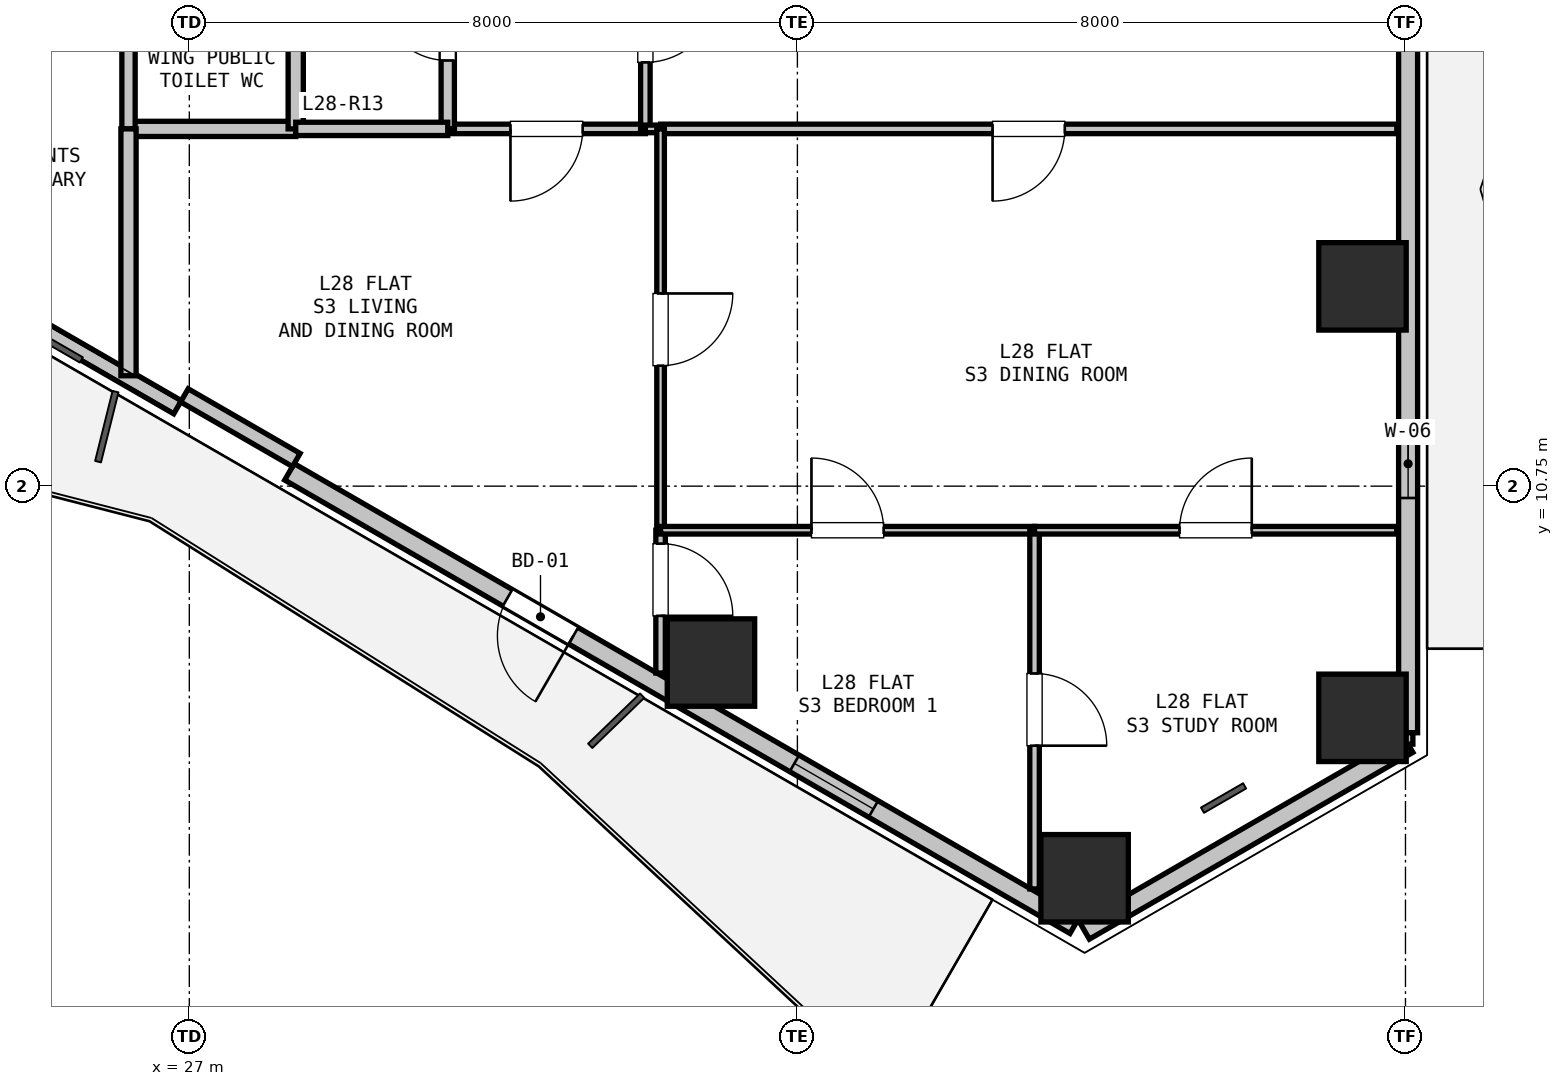
"""IFC4 building model, lengths in metres.
Left out: names, types, materials, properties, quantities, classifications, styles, units other than length and angle.
Written with IfcOpenShell. Run it as: python <this file> out.ifc"""

import sys

from ifc_helpers import new_model, si_unit, direction, frame, frame_2d, origin, origin_2d, place, context, subcontext, project, spatial, rectangle, hollow_rectangle, extrude, element, fill, save


model = new_model("IFC4")
c1 = context("Model", 3, precision=1e-05, world=origin(), true_north=direction((0.0, 1.0)))
c2 = subcontext(c1, "Body", "Model", "MODEL_VIEW")
j1 = project(units=[si_unit("LENGTHUNIT", "METRE"), si_unit("PLANEANGLEUNIT", "RADIAN")], contexts=[c1])
p1 = place(None, origin())
s1 = spatial("IfcSite", under=j1, at=p1, CompositionType="ELEMENT")
p2 = place(p1, origin())
s2 = spatial("IfcBuilding", under=s1, at=p2, CompositionType="ELEMENT")
p3 = place(p2, frame((0.0, 0.0, 103.2)))
s3 = spatial("IfcBuildingStorey", under=s2, at=p3, CompositionType="ELEMENT", Elevation=103.2)
for number, where, z_axis, x_axis in (
    (1, (42.435, 13.378, 0.0), (0.0, 0.0, 1.0), (1.0, 0.0, 0.0)),
    (2, (42.435, 7.702, 0.0), (0.0, 0.0, 1.0), (1.0, 0.0, 0.0)),
    (3, (38.779, 5.591, 0.0), (0.0, 0.0, 1.0), (1.0, 0.0, 0.0)),
    (4, (33.863, 8.429, 0.0), (0.0, 0.0, 1.0), (1.0, 0.0, 0.0)),
):
    element("IfcColumn", number, at=place(p3, frame(where, z_axis=z_axis, x_axis=x_axis)), inside=s3, PredefinedType="COLUMN", context=c2, shape_type="SweptSolid", body=[
        extrude(hollow_rectangle(XDim=1.15, YDim=1.15, WallThickness=0.032, at=origin_2d()), origin(), (0.0, 0.0, 1.0), 3.3),
    ])
p4 = place(p3, frame((43.035, 7.356, 0.0), z_axis=(0.0, 0.0, 1.0), x_axis=(-0.866011848704, -0.500023477353, 0.0)))
e5 = element("IfcWall", 5, at=p4, inside=s3, PredefinedType="SOLIDWALL", context=c2, shape_type="SweptSolid", body=[
    extrude(rectangle(XDim=4.914, YDim=0.25, at=frame_2d((2.457, 0.0))), origin(), (0.0, 0.0, 1.0), 2.67),
])
p5 = place(p3, frame((43.035, 19.435, 0.0), z_axis=(0.0, 0.0, 1.0), x_axis=(0.0, -1.0, 0.0)))
e6 = element("IfcWall", 6, at=p5, inside=s3, PredefinedType="SOLIDWALL", context=c2, shape_type="SweptSolid", body=[
    extrude(rectangle(XDim=11.93, YDim=0.25, at=frame_2d((5.965, 0.0))), origin(), (0.0, 0.0, 1.0), 2.67),
])
p6 = place(p5, frame((7.941, 0.0, 0.9)))
e7 = element("IfcOpeningElement", 7, at=p6, cuts=e6, PredefinedType="OPENING", context=c2, shape_type="SweptSolid", body=[
    extrude(rectangle(XDim=0.9, YDim=1.4, at=frame_2d((0.45, 0.7))), frame((0.0, 0.135, 0.0), z_axis=(0.0, -1.0, 0.0), x_axis=(1.0, 0.0, 0.0)), (0.0, 0.0, 1.0), 0.27),
])
p7 = place(p3, frame((38.649, 4.973, 0.0), z_axis=(0.0, 0.0, 1.0), x_axis=(-0.866023023012, 0.500004123596, 0.0)))
e8 = element("IfcWall", 8, at=p7, inside=s3, PredefinedType="SOLIDWALL", context=c2, shape_type="SweptSolid", body=[
    extrude(rectangle(XDim=11.93, YDim=0.25, at=frame_2d((5.965, 0.0))), origin(), (0.0, 0.0, 1.0), 2.67),
])
p8 = place(p7, frame((7.616, 0.0, 0.0)))
e9 = element("IfcOpeningElement", 9, at=p8, cuts=e8, PredefinedType="OPENING", context=c2, shape_type="SweptSolid", body=[
    extrude(rectangle(XDim=1.0, YDim=2.1, at=frame_2d((0.5, 1.05))), frame((0.0, 0.135, 0.0), z_axis=(0.0, -1.0, 0.0), x_axis=(1.0, 0.0, 0.0)), (0.0, 0.0, 1.0), 0.27),
])
p9 = place(p7, frame((3.059, 0.0, 0.9)))
e10 = element("IfcOpeningElement", 10, at=p9, cuts=e8, PredefinedType="OPENING", context=c2, shape_type="SweptSolid", body=[
    extrude(rectangle(XDim=1.2, YDim=1.4, at=frame_2d((0.6, 0.7))), frame((0.0, 0.135, 0.0), z_axis=(0.0, -1.0, 0.0), x_axis=(1.0, 0.0, 0.0)), (0.0, 0.0, 1.0), 0.27),
])
p10 = place(p3, frame((26.845, 11.788, 0.0), z_axis=(0.0, 0.0, 1.0), x_axis=(-0.866027010039, 0.499997217876, 0.0)))
e11 = element("IfcWall", 11, at=p10, inside=s3, PredefinedType="PARAPET", context=c2, shape_type="SweptSolid", body=[
    extrude(rectangle(XDim=11.229, YDim=0.2, at=frame_2d((5.615, 0.0))), origin(), (0.0, 0.0, 1.0), 0.2),
])
p11 = place(p3, frame((28.407, 11.094, 0.0), z_axis=(0.0, 0.0, 1.0), x_axis=(-0.86605165483, 0.499954529098, 0.0)))
e12 = element("IfcWall", 12, at=p11, inside=s3, PredefinedType="PARAPET", context=c2, shape_type="SweptSolid", body=[
    extrude(rectangle(XDim=1.7, YDim=0.2, at=frame_2d((0.85, 0.0))), origin(), (0.0, 0.0, 1.0), 2.67),
])
p12 = place(p3, frame((33.0, 15.45, 0.0), z_axis=(0.0, 0.0, 1.0), x_axis=(-1.0, 0.0, 0.0)))
e13 = element("IfcWall", 13, at=p12, inside=s3, PredefinedType="PARTITIONING", context=c2, shape_type="SweptSolid", body=[
    extrude(rectangle(XDim=2.6, YDim=0.125, at=frame_2d((1.3, 0.0))), origin(), (0.0, 0.0, 1.0), 3.05),
])
p13 = place(p12, frame((0.825, 0.0, 0.0)))
e14 = element("IfcOpeningElement", 14, at=p13, cuts=e13, PredefinedType="OPENING", context=c2, shape_type="SweptSolid", body=[
    extrude(rectangle(XDim=0.95, YDim=2.1, at=frame_2d((0.475, 1.05))), frame((0.0, 0.073, 0.0), z_axis=(0.0, -1.0, 0.0), x_axis=(1.0, 0.0, 0.0)), (0.0, 0.0, 1.0), 0.145),
])
p14 = place(p3, frame((30.4, 15.45, 0.0), z_axis=(0.0, 0.0, 1.0), x_axis=(0.0, 1.0, 0.0)))
e15 = element("IfcWall", 15, at=p14, inside=s3, PredefinedType="PLUMBINGWALL", context=c2, shape_type="SweptSolid", body=[
    extrude(rectangle(XDim=2.7, YDim=0.175, at=frame_2d((1.35, 0.0))), origin(), (0.0, 0.0, 1.0), 3.05),
])
p15 = place(p14, frame((0.9, 0.0, 0.0)))
e16 = element("IfcOpeningElement", 16, at=p15, cuts=e15, PredefinedType="OPENING", context=c2, shape_type="SweptSolid", body=[
    extrude(rectangle(XDim=0.9, YDim=2.1, at=frame_2d((0.45, 1.05))), frame((0.0, 0.097, 0.0), z_axis=(0.0, -1.0, 0.0), x_axis=(1.0, 0.0, 0.0)), (0.0, 0.0, 1.0), 0.195),
])
p16 = place(p3, frame((33.0, 18.15, 0.0), z_axis=(0.0, 0.0, 1.0), x_axis=(0.0, -1.0, 0.0)))
e17 = element("IfcWall", 17, at=p16, inside=s3, PredefinedType="PARTITIONING", context=c2, shape_type="SweptSolid", body=[
    extrude(rectangle(XDim=2.7, YDim=0.125, at=frame_2d((1.35, 0.0))), origin(), (0.0, 0.0, 1.0), 3.05),
])
p17 = place(p16, frame((0.875, 0.0, 0.0)))
e18 = element("IfcOpeningElement", 18, at=p17, cuts=e17, PredefinedType="OPENING", context=c2, shape_type="SweptSolid", body=[
    extrude(rectangle(XDim=0.95, YDim=2.1, at=frame_2d((0.475, 1.05))), frame((0.0, 0.073, 0.0), z_axis=(0.0, -1.0, 0.0), x_axis=(1.0, 0.0, 0.0)), (0.0, 0.0, 1.0), 0.145),
])
p18 = place(p3, frame((28.4, 15.45, 0.0), z_axis=(0.0, 0.0, 1.0), x_axis=(-1.0, 0.0, 0.0)))
e19 = element("IfcWall", 19, at=p18, inside=s3, PredefinedType="PARTITIONING", context=c2, shape_type="SweptSolid", body=[
    extrude(rectangle(XDim=2.2, YDim=0.2, at=frame_2d((1.1, 0.0))), origin(), (0.0, 0.0, 1.0), 2.423),
])
p19 = place(p3, frame((26.2, 15.45, 0.0), z_axis=(0.0, 0.0, 1.0), x_axis=(0.0, 1.0, 0.0)))
e20 = element("IfcWall", 20, at=p19, inside=s3, PredefinedType="PLUMBINGWALL", context=c2, shape_type="SweptSolid", body=[
    extrude(rectangle(XDim=2.7, YDim=0.175, at=frame_2d((1.35, 0.0))), origin(), (0.0, 0.0, 1.0), 2.423),
])
p20 = place(p3, frame((28.4, 18.15, 0.0), z_axis=(0.0, 0.0, 1.0), x_axis=(0.0, -1.0, 0.0)))
e21 = element("IfcWall", 21, at=p20, inside=s3, PredefinedType="PARTITIONING", context=c2, shape_type="SweptSolid", body=[
    extrude(rectangle(XDim=2.7, YDim=0.2, at=frame_2d((1.35, 0.0))), origin(), (0.0, 0.0, 1.0), 3.05),
])
p21 = place(p3, frame((30.4, 15.45, 0.0), z_axis=(0.0, 0.0, 1.0), x_axis=(-1.0, 0.0, 0.0)))
e22 = element("IfcWall", 22, at=p21, inside=s3, PredefinedType="PLUMBINGWALL", context=c2, shape_type="SweptSolid", body=[
    extrude(rectangle(XDim=2.0, YDim=0.175, at=frame_2d((1.0, 0.0))), origin(), (0.0, 0.0, 1.0), 3.05),
])
p22 = place(p3, frame((42.885, 15.45, 0.0), z_axis=(0.0, 0.0, 1.0), x_axis=(-1.0, 0.0, 0.0)))
e23 = element("IfcWall", 23, at=p22, inside=s3, PredefinedType="PARTITIONING", context=c2, shape_type="SweptSolid", body=[
    extrude(rectangle(XDim=9.686, YDim=0.125, at=frame_2d((4.843, 0.0))), origin(), (0.0, 0.0, 1.0), 2.365),
])
p23 = place(p22, frame((4.368, 0.0, 0.0)))
e24 = element("IfcOpeningElement", 24, at=p23, cuts=e23, PredefinedType="OPENING", context=c2, shape_type="SweptSolid", body=[
    extrude(rectangle(XDim=0.95, YDim=2.1, at=frame_2d((0.475, 1.05))), frame((0.0, 0.073, 0.0), z_axis=(0.0, -1.0, 0.0), x_axis=(1.0, 0.0, 0.0)), (0.0, 0.0, 1.0), 0.145),
])
p24 = place(p3, frame((33.2, 15.45, 0.0), z_axis=(0.0, 0.0, 1.0), x_axis=(-1.0, 0.0, 0.0)))
e25 = element("IfcWall", 25, at=p24, inside=s3, PredefinedType="PARTITIONING", context=c2, shape_type="SweptSolid", body=[
    extrude(rectangle(XDim=0.2, YDim=0.1, at=frame_2d((0.1, 0.0))), origin(), (0.0, 0.0, 1.0), 3.05),
])
p25 = place(p3, frame((26.2, 15.45, 0.0), z_axis=(0.0, 0.0, 1.0), x_axis=(0.0, -1.0, 0.0)))
e26 = element("IfcWall", 26, at=p25, inside=s3, PredefinedType="PARTITIONING", context=c2, shape_type="SweptSolid", body=[
    extrude(rectangle(XDim=3.248, YDim=0.2, at=frame_2d((1.624, 0.0))), origin(), (0.0, 0.0, 1.0), 2.365),
])
p26 = place(p3, frame((33.2, 15.45, 0.0), z_axis=(0.0, 0.0, 1.0), x_axis=(0.0, -1.0, 0.0)))
e27 = element("IfcWall", 27, at=p26, inside=s3, PredefinedType="PARTITIONING", context=c2, shape_type="SweptSolid", body=[
    extrude(rectangle(XDim=5.28, YDim=0.1, at=frame_2d((2.64, 0.0))), origin(), (0.0, 0.0, 1.0), 3.05),
])
p27 = place(p26, frame((2.165, 0.0, 0.0)))
e28 = element("IfcOpeningElement", 28, at=p27, cuts=e27, PredefinedType="OPENING", context=c2, shape_type="SweptSolid", body=[
    extrude(rectangle(XDim=0.95, YDim=2.1, at=frame_2d((0.475, 1.05))), frame((0.0, 0.06, 0.0), z_axis=(0.0, -1.0, 0.0), x_axis=(1.0, 0.0, 0.0)), (0.0, 0.0, 1.0), 0.12),
])
p28 = place(p3, frame((33.2, 10.17, 0.0), z_axis=(0.0, 0.0, 1.0), x_axis=(0.0, -1.0, 0.0)))
e29 = element("IfcWall", 29, at=p28, inside=s3, PredefinedType="PARTITIONING", context=c2, shape_type="SweptSolid", body=[
    extrude(rectangle(XDim=1.878, YDim=0.125, at=frame_2d((0.939, 0.0))), origin(), (0.0, 0.0, 1.0), 2.365),
])
p29 = place(p28, frame((0.176, 0.0, 0.0)))
e30 = element("IfcOpeningElement", 30, at=p29, cuts=e29, PredefinedType="OPENING", context=c2, shape_type="SweptSolid", body=[
    extrude(rectangle(XDim=0.95, YDim=2.1, at=frame_2d((0.475, 1.05))), frame((0.0, 0.073, 0.0), z_axis=(0.0, -1.0, 0.0), x_axis=(1.0, 0.0, 0.0)), (0.0, 0.0, 1.0), 0.145),
])
p30 = place(p3, frame((33.2, 10.17, 0.0), z_axis=(0.0, 0.0, 1.0), x_axis=(1.0, 0.0, 0.0)))
e31 = element("IfcWall", 31, at=p30, inside=s3, PredefinedType="PARTITIONING", context=c2, shape_type="SweptSolid", body=[
    extrude(rectangle(XDim=4.92, YDim=0.1, at=frame_2d((2.46, 0.0))), origin(), (0.0, 0.0, 1.0), 3.05),
])
p31 = place(p30, frame((1.985, 0.0, 0.0)))
e32 = element("IfcOpeningElement", 32, at=p31, cuts=e31, PredefinedType="OPENING", context=c2, shape_type="SweptSolid", body=[
    extrude(rectangle(XDim=0.95, YDim=2.1, at=frame_2d((0.475, 1.05))), frame((0.0, 0.06, 0.0), z_axis=(0.0, -1.0, 0.0), x_axis=(1.0, 0.0, 0.0)), (0.0, 0.0, 1.0), 0.12),
])
p32 = place(p3, frame((38.12, 10.17, 0.0), z_axis=(0.0, 0.0, 1.0), x_axis=(0.0, -1.0, 0.0)))
e33 = element("IfcWall", 33, at=p32, inside=s3, PredefinedType="PARTITIONING", context=c2, shape_type="SweptSolid", body=[
    extrude(rectangle(XDim=4.719, YDim=0.125, at=frame_2d((2.359, 0.0))), origin(), (0.0, 0.0, 1.0), 2.715),
])
p33 = place(p32, frame((1.885, 0.0, 0.0)))
e34 = element("IfcOpeningElement", 34, at=p33, cuts=e33, PredefinedType="OPENING", context=c2, shape_type="SweptSolid", body=[
    extrude(rectangle(XDim=0.95, YDim=2.1, at=frame_2d((0.475, 1.05))), frame((0.0, 0.073, 0.0), z_axis=(0.0, -1.0, 0.0), x_axis=(1.0, 0.0, 0.0)), (0.0, 0.0, 1.0), 0.145),
])
p34 = place(p3, frame((38.12, 10.17, 0.0), z_axis=(0.0, 0.0, 1.0), x_axis=(1.0, 0.0, 0.0)))
e35 = element("IfcWall", 35, at=p34, inside=s3, PredefinedType="PARTITIONING", context=c2, shape_type="SweptSolid", body=[
    extrude(rectangle(XDim=4.765, YDim=0.1, at=frame_2d((2.383, 0.0))), origin(), (0.0, 0.0, 1.0), 2.423),
])
p35 = place(p34, frame((1.908, 0.0, 0.0)))
e36 = element("IfcOpeningElement", 36, at=p35, cuts=e35, PredefinedType="OPENING", context=c2, shape_type="SweptSolid", body=[
    extrude(rectangle(XDim=0.95, YDim=2.1, at=frame_2d((0.475, 1.05))), frame((0.0, 0.06, 0.0), z_axis=(0.0, -1.0, 0.0), x_axis=(1.0, 0.0, 0.0)), (0.0, 0.0, 1.0), 0.12),
])
p36 = place(p3, frame((43.035, 7.506, 0.0), z_axis=(0.0, 0.0, 1.0), x_axis=(0.0, -1.0, 0.0)))
e37 = element("IfcWall", 37, at=p36, inside=s3, PredefinedType="PARTITIONING", context=c2, shape_type="SweptSolid", body=[
    extrude(rectangle(XDim=0.15, YDim=0.125, at=frame_2d((0.075, 0.0))), origin(), (0.0, 0.0, 1.0), 3.05),
])
p37 = place(p6, origin())
e38 = element("IfcWindow", 38, at=p37, inside=s3, PartitioningType="SINGLE_PANEL", PredefinedType="WINDOW", context=c2, shape_type="SweptSolid", body=[
    extrude(rectangle(XDim=0.9, YDim=1.4, at=frame_2d((0.45, 0.7))), frame((0.0, 0.03, 0.0), z_axis=(0.0, -1.0, 0.0), x_axis=(1.0, 0.0, 0.0)), (0.0, 0.0, 1.0), 0.06),
])
fill(e7, e38)
p38 = place(p8, origin())
e39 = element("IfcDoor", 39, at=p38, inside=s3, OperationType="SINGLE_SWING_LEFT", PredefinedType="DOOR", context=c2, shape_type="SweptSolid", body=[
    extrude(rectangle(XDim=1.0, YDim=2.1, at=frame_2d((0.5, 1.05))), frame((0.0, 0.025, 0.0), z_axis=(0.0, -1.0, 0.0), x_axis=(1.0, 0.0, 0.0)), (0.0, 0.0, 1.0), 0.05),
])
fill(e9, e39)
p39 = place(p9, origin())
e40 = element("IfcWindow", 40, at=p39, inside=s3, PartitioningType="SINGLE_PANEL", PredefinedType="WINDOW", context=c2, shape_type="SweptSolid", body=[
    extrude(rectangle(XDim=1.2, YDim=1.4, at=frame_2d((0.6, 0.7))), frame((0.0, 0.03, 0.0), z_axis=(0.0, -1.0, 0.0), x_axis=(1.0, 0.0, 0.0)), (0.0, 0.0, 1.0), 0.06),
])
fill(e10, e40)
p40 = place(p15, origin())
e41 = element("IfcDoor", 41, at=p40, inside=s3, OperationType="SINGLE_SWING_RIGHT", PredefinedType="DOOR", context=c2, shape_type="SweptSolid", body=[
    extrude(rectangle(XDim=0.9, YDim=2.1, at=frame_2d((0.45, 1.05))), frame((0.0, 0.025, 0.0), z_axis=(0.0, -1.0, 0.0), x_axis=(1.0, 0.0, 0.0)), (0.0, 0.0, 1.0), 0.05),
])
fill(e16, e41)
p41 = place(p17, origin())
e42 = element("IfcDoor", 42, at=p41, inside=s3, OperationType="SINGLE_SWING_LEFT", PredefinedType="DOOR", context=c2, shape_type="SweptSolid", body=[
    extrude(rectangle(XDim=0.95, YDim=2.1, at=frame_2d((0.475, 1.05))), frame((0.0, 0.025, 0.0), z_axis=(0.0, -1.0, 0.0), x_axis=(1.0, 0.0, 0.0)), (0.0, 0.0, 1.0), 0.05),
])
fill(e18, e42)
p42 = place(p13, origin())
e43 = element("IfcDoor", 43, at=p42, inside=s3, OperationType="SINGLE_SWING_RIGHT", PredefinedType="DOOR", context=c2, shape_type="SweptSolid", body=[
    extrude(rectangle(XDim=0.95, YDim=2.1, at=frame_2d((0.475, 1.05))), frame((0.0, 0.025, 0.0), z_axis=(0.0, -1.0, 0.0), x_axis=(1.0, 0.0, 0.0)), (0.0, 0.0, 1.0), 0.05),
])
fill(e14, e43)
p43 = place(p23, origin())
e44 = element("IfcDoor", 44, at=p43, inside=s3, OperationType="SINGLE_SWING_RIGHT", PredefinedType="DOOR", context=c2, shape_type="SweptSolid", body=[
    extrude(rectangle(XDim=0.95, YDim=2.1, at=frame_2d((0.475, 1.05))), frame((0.0, 0.025, 0.0), z_axis=(0.0, -1.0, 0.0), x_axis=(1.0, 0.0, 0.0)), (0.0, 0.0, 1.0), 0.05),
])
fill(e24, e44)
p44 = place(p29, origin())
e45 = element("IfcDoor", 45, at=p44, inside=s3, OperationType="SINGLE_SWING_RIGHT", PredefinedType="DOOR", context=c2, shape_type="SweptSolid", body=[
    extrude(rectangle(XDim=0.95, YDim=2.1, at=frame_2d((0.475, 1.05))), frame((0.0, 0.025, 0.0), z_axis=(0.0, -1.0, 0.0), x_axis=(1.0, 0.0, 0.0)), (0.0, 0.0, 1.0), 0.05),
])
fill(e30, e45)
p45 = place(p27, origin())
e46 = element("IfcDoor", 46, at=p45, inside=s3, OperationType="SINGLE_SWING_LEFT", PredefinedType="DOOR", context=c2, shape_type="SweptSolid", body=[
    extrude(rectangle(XDim=0.95, YDim=2.1, at=frame_2d((0.475, 1.05))), frame((0.0, 0.025, 0.0), z_axis=(0.0, -1.0, 0.0), x_axis=(1.0, 0.0, 0.0)), (0.0, 0.0, 1.0), 0.05),
])
fill(e28, e46)
p46 = place(p33, origin())
e47 = element("IfcDoor", 47, at=p46, inside=s3, OperationType="SINGLE_SWING_RIGHT", PredefinedType="DOOR", context=c2, shape_type="SweptSolid", body=[
    extrude(rectangle(XDim=0.95, YDim=2.1, at=frame_2d((0.475, 1.05))), frame((0.0, 0.025, 0.0), z_axis=(0.0, -1.0, 0.0), x_axis=(1.0, 0.0, 0.0)), (0.0, 0.0, 1.0), 0.05),
])
fill(e34, e47)
p47 = place(p31, origin())
e48 = element("IfcDoor", 48, at=p47, inside=s3, OperationType="SINGLE_SWING_LEFT", PredefinedType="DOOR", context=c2, shape_type="SweptSolid", body=[
    extrude(rectangle(XDim=0.95, YDim=2.1, at=frame_2d((0.475, 1.05))), frame((0.0, 0.025, 0.0), z_axis=(0.0, -1.0, 0.0), x_axis=(1.0, 0.0, 0.0)), (0.0, 0.0, 1.0), 0.05),
])
fill(e32, e48)
p48 = place(p35, origin())
e49 = element("IfcDoor", 49, at=p48, inside=s3, OperationType="SINGLE_SWING_RIGHT", PredefinedType="DOOR", context=c2, shape_type="SweptSolid", body=[
    extrude(rectangle(XDim=0.95, YDim=2.1, at=frame_2d((0.475, 1.05))), frame((0.0, 0.025, 0.0), z_axis=(0.0, -1.0, 0.0), x_axis=(1.0, 0.0, 0.0)), (0.0, 0.0, 1.0), 0.05),
])
fill(e36, e49)
save(model, sys.argv[1])
